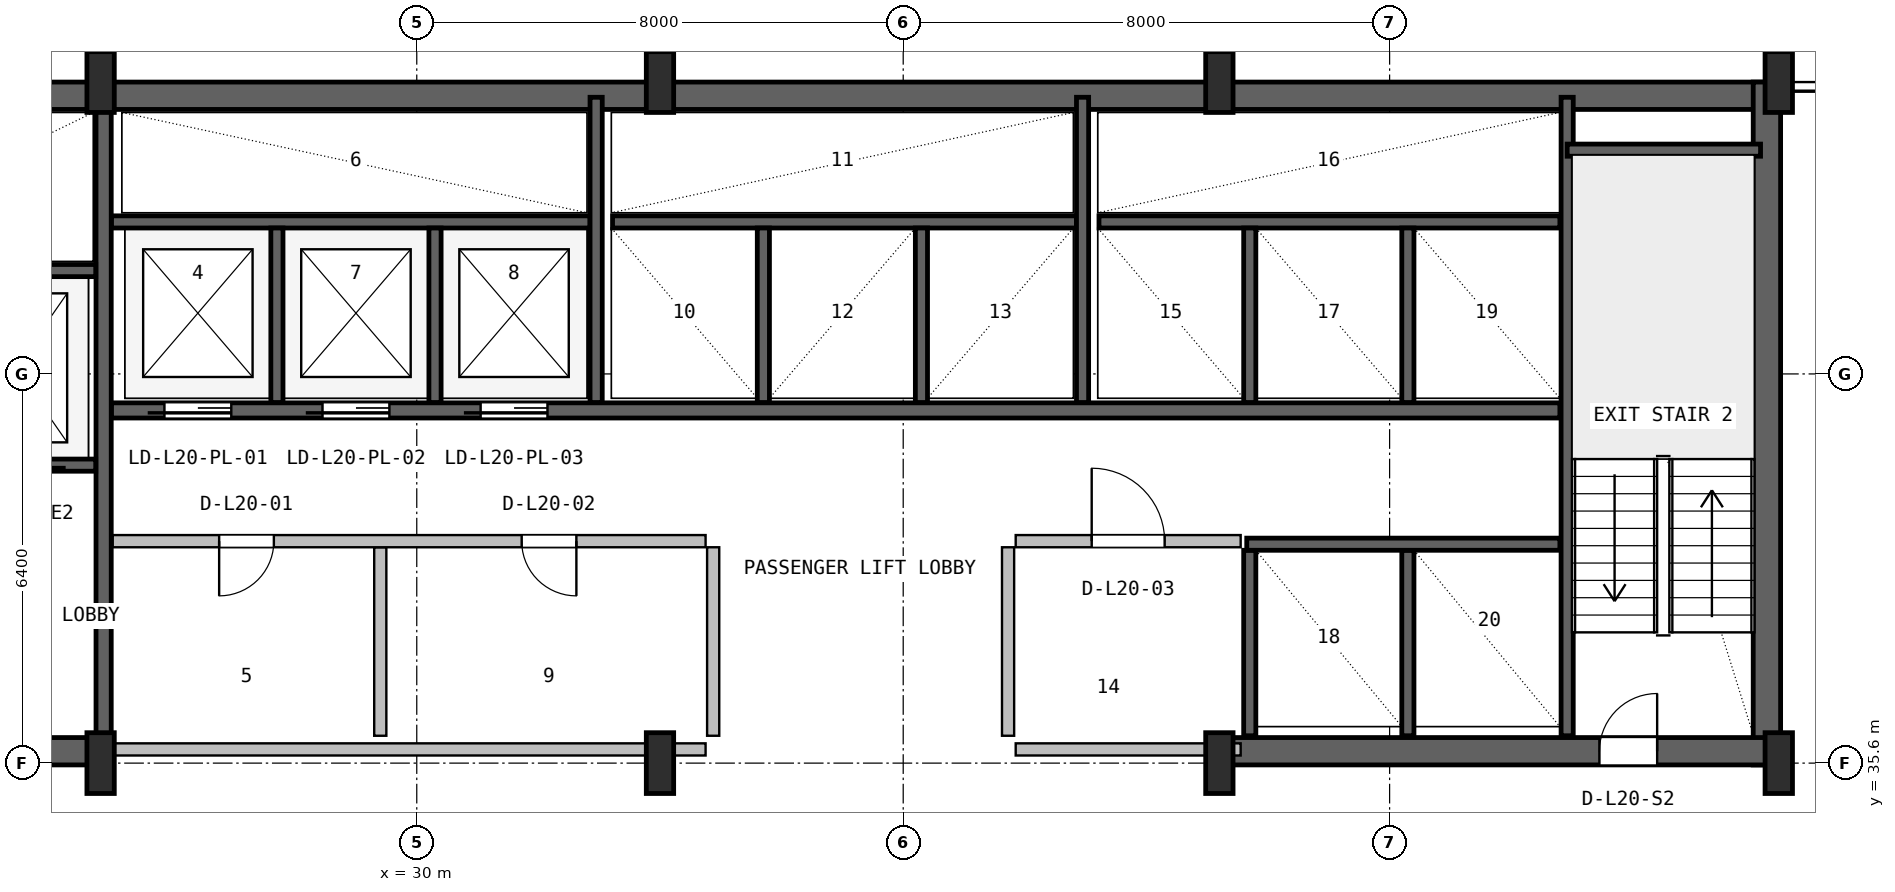
"""IFC4 building model, lengths in metres.
Left out: names, types, materials, properties, quantities, classifications, styles, units other than length and angle.
Written with IfcOpenShell. Run it as: python <this file> out.ifc"""

import sys

from ifc_helpers import new_model, si_unit, direction, frame, frame_2d, origin, origin_2d, place, context, subcontext, project, spatial, rectangle, i_section, extrude, source, transform, mapped, element, fill, save


model = new_model("IFC4")
c1 = context("Model", 3, precision=1e-05, world=origin(), true_north=direction((0.0, 1.0)))
c2 = subcontext(c1, "Body", "Model", "MODEL_VIEW")
j1 = project(units=[si_unit("LENGTHUNIT", "METRE"), si_unit("PLANEANGLEUNIT", "RADIAN")], contexts=[c1])
p1 = place(None, origin())
s1 = spatial("IfcSite", under=j1, at=p1, CompositionType="ELEMENT")
p2 = place(p1, origin())
s2 = spatial("IfcBuilding", under=s1, at=p2, CompositionType="ELEMENT")
p3 = place(p2, frame((0.0, 0.0, 87.0)))
s3 = spatial("IfcBuildingStorey", under=s2, at=p3, CompositionType="ELEMENT", Elevation=87.0)
p4 = place(p3, frame((15.6, 46.575, 0.0), z_axis=(0.0, 0.0, 1.0), x_axis=(1.0, 0.0, 0.0)))
e1 = element("IfcWall", 1, at=p4, inside=s3, PredefinedType="SHEAR", context=c2, shape_type="SweptSolid", body=[
    extrude(rectangle(XDim=36.8, YDim=0.45, at=frame_2d((18.4, 0.0))), origin(), (0.0, 0.0, 1.0), 3.55),
])
p5 = place(p3, frame((52.205, 35.57, 0.0), z_axis=(0.0, 0.0, 1.0), x_axis=(0.0, 1.0, 0.0)))
e2 = element("IfcWall", 2, at=p5, inside=s3, PredefinedType="SHEAR", context=c2, shape_type="SweptSolid", body=[
    extrude(rectangle(XDim=11.23, YDim=0.45, at=frame_2d((5.615, 0.0))), origin(), (0.0, 0.0, 1.0), 3.55),
])
p6 = place(p3, frame((15.57, 35.795, 0.0), z_axis=(0.0, 0.0, 1.0), x_axis=(1.0, 0.0, 0.0)))
e3 = element("IfcWall", 3, at=p6, inside=s3, PredefinedType="SHEAR", context=c2, shape_type="SweptSolid", body=[
    extrude(rectangle(XDim=9.23, YDim=0.45, at=frame_2d((4.615, 0.0))), origin(), (0.0, 0.0, 1.0), 3.55),
])
p7 = place(p6, frame((5.4, 0.0, 0.0)))
e4 = element("IfcOpeningElement", 4, at=p7, cuts=e3, PredefinedType="OPENING", context=c2, shape_type="SweptSolid", body=[
    extrude(rectangle(XDim=1.0, YDim=2.1, at=frame_2d((0.5, 1.05))), frame((0.0, 0.235, 0.0), z_axis=(0.0, -1.0, 0.0), x_axis=(1.0, 0.0, 0.0)), (0.0, 0.0, 1.0), 0.47),
])
p8 = place(p3, frame((43.2, 35.795, 0.0), z_axis=(0.0, 0.0, 1.0), x_axis=(1.0, 0.0, 0.0)))
e5 = element("IfcWall", 5, at=p8, inside=s3, PredefinedType="SHEAR", context=c2, shape_type="SweptSolid", body=[
    extrude(rectangle(XDim=9.23, YDim=0.45, at=frame_2d((4.615, 0.0))), origin(), (0.0, 0.0, 1.0), 3.55),
])
p9 = place(p8, frame((6.25, 0.0, 0.0)))
e6 = element("IfcOpeningElement", 6, at=p9, cuts=e5, PredefinedType="OPENING", context=c2, shape_type="SweptSolid", body=[
    extrude(rectangle(XDim=0.95, YDim=2.1, at=frame_2d((0.475, 1.05))), frame((0.0, 0.235, 0.0), z_axis=(0.0, -1.0, 0.0), x_axis=(1.0, 0.0, 0.0)), (0.0, 0.0, 1.0), 0.47),
])
m1 = source(origin(), c2, "Body", "SweptSolid", [
    extrude(i_section(OverallWidth=0.45, OverallDepth=1.0, WebThickness=0.016, FlangeThickness=0.03, FilletRadius=0.016, at=origin_2d()), origin(), (0.0, 0.0, 1.0), 3.8),
])
for number, where, z_axis, x_axis in (
    (7, (24.8, 35.6, 0.0), (0.0, 0.0, 1.0), (1.0, 0.0, 0.0)),
    (8, (24.8, 46.8, 0.0), (0.0, 0.0, 1.0), (1.0, 0.0, 0.0)),
    (9, (34.0, 35.6, 0.0), (0.0, 0.0, 1.0), (1.0, 0.0, 0.0)),
    (10, (34.0, 46.8, 0.0), (0.0, 0.0, 1.0), (1.0, 0.0, 0.0)),
    (11, (43.2, 35.6, 0.0), (0.0, 0.0, 1.0), (1.0, 0.0, 0.0)),
    (12, (43.2, 46.8, 0.0), (0.0, 0.0, 1.0), (1.0, 0.0, 0.0)),
    (13, (52.4, 35.6, 0.0), (0.0, 0.0, 1.0), (1.0, 0.0, 0.0)),
    (14, (52.4, 46.8, 0.0), (0.0, 0.0, 1.0), (1.0, 0.0, 0.0)),
):
    element("IfcColumn", number, at=place(p3, frame(where, z_axis=z_axis, x_axis=x_axis)), inside=s3, PredefinedType="COLUMN", context=c2, shape_type="MappedRepresentation", body=[
        mapped(m1, transform((0.0, 0.0, 0.0), x_axis=(1.0, 0.0, 0.0), y_axis=(0.0, 1.0, 0.0), z_axis=(0.0, 0.0, 1.0), scale=1.0)),
    ])
p10 = place(p3, frame((24.85, 36.05, 0.0), z_axis=(0.0, 0.0, 1.0), x_axis=(0.0, 1.0, 0.0)))
e15 = element("IfcWall", 15, at=p10, inside=s3, PredefinedType="SHEAR", context=c2, shape_type="SweptSolid", body=[
    extrude(rectangle(XDim=10.45, YDim=0.25, at=frame_2d((5.225, 0.0))), origin(), (0.0, 0.0, 1.0), 3.55),
])
p11 = place(p3, frame((19.2, 40.5, 0.0), z_axis=(0.0, 0.0, 1.0), x_axis=(1.0, 0.0, 0.0)))
e16 = element("IfcWall", 16, at=p11, inside=s3, PredefinedType="SHEAR", context=c2, shape_type="SweptSolid", body=[
    extrude(rectangle(XDim=5.52, YDim=0.2, at=frame_2d((2.76, 0.0))), origin(), (0.0, 0.0, 1.0), 3.55),
])
p12 = place(p11, frame((1.05, 0.0, 0.0)))
e17 = element("IfcOpeningElement", 17, at=p12, cuts=e16, PredefinedType="OPENING", context=c2, shape_type="SweptSolid", body=[
    extrude(rectangle(XDim=1.1, YDim=2.18, at=frame_2d((0.55, 1.09))), frame((0.0, 0.11, 0.0), z_axis=(0.0, -1.0, 0.0), x_axis=(1.0, 0.0, 0.0)), (0.0, 0.0, 1.0), 0.22),
])
p13 = place(p11, frame((3.65, 0.0, 0.0)))
e18 = element("IfcOpeningElement", 18, at=p13, cuts=e16, PredefinedType="OPENING", context=c2, shape_type="SweptSolid", body=[
    extrude(rectangle(XDim=1.1, YDim=2.18, at=frame_2d((0.55, 1.09))), frame((0.0, 0.11, 0.0), z_axis=(0.0, -1.0, 0.0), x_axis=(1.0, 0.0, 0.0)), (0.0, 0.0, 1.0), 0.22),
])
p14 = place(p3, frame((19.2, 43.7, 0.0), z_axis=(0.0, 0.0, 1.0), x_axis=(1.0, 0.0, 0.0)))
e19 = element("IfcWall", 19, at=p14, inside=s3, PredefinedType="SHEAR", context=c2, shape_type="SweptSolid", body=[
    extrude(rectangle(XDim=5.52, YDim=0.2, at=frame_2d((2.76, 0.0))), origin(), (0.0, 0.0, 1.0), 3.55),
])
p15 = place(p3, frame((48.92, 36.05, 0.0), z_axis=(0.0, 0.0, 1.0), x_axis=(0.0, 1.0, 0.0)))
e20 = element("IfcWall", 20, at=p15, inside=s3, PredefinedType="SHEAR", context=c2, shape_type="SweptSolid", body=[
    extrude(rectangle(XDim=10.5, YDim=0.2, at=frame_2d((5.25, 0.0))), origin(), (0.0, 0.0, 1.0), 3.55),
])
p16 = place(p3, frame((48.92, 45.68, 0.0), z_axis=(0.0, 0.0, 1.0), x_axis=(1.0, 0.0, 0.0)))
e21 = element("IfcWall", 21, at=p16, inside=s3, PredefinedType="SHEAR", context=c2, shape_type="SweptSolid", body=[
    extrude(rectangle(XDim=3.18, YDim=0.2, at=frame_2d((1.59, 0.0))), origin(), (0.0, 0.0, 1.0), 3.55),
])
p17 = place(p3, frame((24.98, 41.4, 0.0), z_axis=(0.0, 0.0, 1.0), x_axis=(1.0, 0.0, 0.0)))
e22 = element("IfcWall", 22, at=p17, inside=s3, PredefinedType="SHEAR", context=c2, shape_type="SweptSolid", body=[
    extrude(rectangle(XDim=23.82, YDim=0.25, at=frame_2d((11.91, 0.0))), origin(), (0.0, 0.0, 1.0), 3.55),
])
p18 = place(p17, frame((0.87, 0.0, 0.0)))
e23 = element("IfcOpeningElement", 23, at=p18, cuts=e22, PredefinedType="OPENING", context=c2, shape_type="SweptSolid", body=[
    extrude(rectangle(XDim=1.1, YDim=2.18, at=frame_2d((0.55, 1.09))), frame((0.0, 0.135, 0.0), z_axis=(0.0, -1.0, 0.0), x_axis=(1.0, 0.0, 0.0)), (0.0, 0.0, 1.0), 0.27),
])
p19 = place(p17, frame((3.47, 0.0, 0.0)))
e24 = element("IfcOpeningElement", 24, at=p19, cuts=e22, PredefinedType="OPENING", context=c2, shape_type="SweptSolid", body=[
    extrude(rectangle(XDim=1.1, YDim=2.18, at=frame_2d((0.55, 1.09))), frame((0.0, 0.135, 0.0), z_axis=(0.0, -1.0, 0.0), x_axis=(1.0, 0.0, 0.0)), (0.0, 0.0, 1.0), 0.27),
])
p20 = place(p17, frame((6.07, 0.0, 0.0)))
e25 = element("IfcOpeningElement", 25, at=p20, cuts=e22, PredefinedType="OPENING", context=c2, shape_type="SweptSolid", body=[
    extrude(rectangle(XDim=1.1, YDim=2.18, at=frame_2d((0.55, 1.09))), frame((0.0, 0.135, 0.0), z_axis=(0.0, -1.0, 0.0), x_axis=(1.0, 0.0, 0.0)), (0.0, 0.0, 1.0), 0.27),
])
p21 = place(p3, frame((24.98, 44.5, 0.0), z_axis=(0.0, 0.0, 1.0), x_axis=(1.0, 0.0, 0.0)))
e26 = element("IfcWall", 26, at=p21, inside=s3, PredefinedType="SHEAR", context=c2, shape_type="SweptSolid", body=[
    extrude(rectangle(XDim=7.87, YDim=0.2, at=frame_2d((3.935, 0.0))), origin(), (0.0, 0.0, 1.0), 3.55),
])
for number, where, z_axis, x_axis in (
    (27, (27.7, 41.53, 0.0), (0.0, 0.0, 1.0), (0.0, 1.0, 0.0)),
    (28, (30.3, 41.53, 0.0), (0.0, 0.0, 1.0), (0.0, 1.0, 0.0)),
):
    element("IfcWall", number, at=place(p3, frame(where, z_axis=z_axis, x_axis=x_axis)), inside=s3, PredefinedType="SHEAR", context=c2, shape_type="SweptSolid", body=[
        extrude(rectangle(XDim=2.87, YDim=0.2, at=frame_2d((1.435, 0.0))), origin(), (0.0, 0.0, 1.0), 3.55),
    ])
p22 = place(p3, frame((32.95, 41.53, 0.0), z_axis=(0.0, 0.0, 1.0), x_axis=(0.0, 1.0, 0.0)))
e29 = element("IfcWall", 29, at=p22, inside=s3, PredefinedType="SHEAR", context=c2, shape_type="SweptSolid", body=[
    extrude(rectangle(XDim=5.02, YDim=0.2, at=frame_2d((2.51, 0.0))), origin(), (0.0, 0.0, 1.0), 3.55),
])
p23 = place(p3, frame((33.22, 44.5, 0.0), z_axis=(0.0, 0.0, 1.0), x_axis=(1.0, 0.0, 0.0)))
e30 = element("IfcWall", 30, at=p23, inside=s3, PredefinedType="SHEAR", context=c2, shape_type="SweptSolid", body=[
    extrude(rectangle(XDim=7.63, YDim=0.2, at=frame_2d((3.815, 0.0))), origin(), (0.0, 0.0, 1.0), 3.55),
])
for number, where, z_axis, x_axis in (
    (31, (35.7, 41.53, 0.0), (0.0, 0.0, 1.0), (0.0, 1.0, 0.0)),
    (32, (38.3, 41.53, 0.0), (0.0, 0.0, 1.0), (0.0, 1.0, 0.0)),
):
    element("IfcWall", number, at=place(p3, frame(where, z_axis=z_axis, x_axis=x_axis)), inside=s3, PredefinedType="SHEAR", context=c2, shape_type="SweptSolid", body=[
        extrude(rectangle(XDim=2.87, YDim=0.2, at=frame_2d((1.435, 0.0))), origin(), (0.0, 0.0, 1.0), 3.55),
    ])
p24 = place(p3, frame((40.95, 41.53, 0.0), z_axis=(0.0, 0.0, 1.0), x_axis=(0.0, 1.0, 0.0)))
e33 = element("IfcWall", 33, at=p24, inside=s3, PredefinedType="SHEAR", context=c2, shape_type="SweptSolid", body=[
    extrude(rectangle(XDim=5.02, YDim=0.2, at=frame_2d((2.51, 0.0))), origin(), (0.0, 0.0, 1.0), 3.55),
])
p25 = place(p3, frame((41.22, 44.5, 0.0), z_axis=(0.0, 0.0, 1.0), x_axis=(1.0, 0.0, 0.0)))
e34 = element("IfcWall", 34, at=p25, inside=s3, PredefinedType="SHEAR", context=c2, shape_type="SweptSolid", body=[
    extrude(rectangle(XDim=7.58, YDim=0.2, at=frame_2d((3.79, 0.0))), origin(), (0.0, 0.0, 1.0), 3.55),
])
for number, where, z_axis, x_axis in (
    (35, (43.7, 41.53, 0.0), (0.0, 0.0, 1.0), (0.0, 1.0, 0.0)),
    (36, (46.3, 41.53, 0.0), (0.0, 0.0, 1.0), (0.0, 1.0, 0.0)),
):
    element("IfcWall", number, at=place(p3, frame(where, z_axis=z_axis, x_axis=x_axis)), inside=s3, PredefinedType="SHEAR", context=c2, shape_type="SweptSolid", body=[
        extrude(rectangle(XDim=2.87, YDim=0.2, at=frame_2d((1.435, 0.0))), origin(), (0.0, 0.0, 1.0), 3.55),
    ])
for number, where, z_axis, x_axis in (
    (37, (43.7, 36.05, 0.0), (0.0, 0.0, 1.0), (0.0, 1.0, 0.0)),
    (38, (46.3, 36.05, 0.0), (0.0, 0.0, 1.0), (0.0, 1.0, 0.0)),
):
    element("IfcWall", number, at=place(p3, frame(where, z_axis=z_axis, x_axis=x_axis)), inside=s3, PredefinedType="SHEAR", context=c2, shape_type="SweptSolid", body=[
        extrude(rectangle(XDim=3.05, YDim=0.2, at=frame_2d((1.525, 0.0))), origin(), (0.0, 0.0, 1.0), 3.55),
    ])
p26 = place(p3, frame((43.65, 39.2, 0.0), z_axis=(0.0, 0.0, 1.0), x_axis=(1.0, 0.0, 0.0)))
e39 = element("IfcWall", 39, at=p26, inside=s3, PredefinedType="SHEAR", context=c2, shape_type="SweptSolid", body=[
    extrude(rectangle(XDim=5.15, YDim=0.2, at=frame_2d((2.575, 0.0))), origin(), (0.0, 0.0, 1.0), 3.55),
])
p27 = place(p3, frame((25.0, 35.825, 0.0), z_axis=(0.0, 0.0, 1.0), x_axis=(1.0, 0.0, 0.0)))
e40 = element("IfcWall", 40, at=p27, inside=s3, PredefinedType="PLUMBINGWALL", context=c2, shape_type="SweptSolid", body=[
    extrude(rectangle(XDim=9.75, YDim=0.2, at=frame_2d((4.875, 0.0))), origin(), (0.0, 0.0, 1.0), 2.325),
])
p28 = place(p3, frame((29.4, 36.05, 0.0), z_axis=(0.0, 0.0, 1.0), x_axis=(0.0, 1.0, 0.0)))
e41 = element("IfcWall", 41, at=p28, inside=s3, PredefinedType="PLUMBINGWALL", context=c2, shape_type="SweptSolid", body=[
    extrude(rectangle(XDim=3.1, YDim=0.2, at=frame_2d((1.55, 0.0))), origin(), (0.0, 0.0, 1.0), 3.53),
])
p29 = place(p3, frame((25.0, 39.25, 0.0), z_axis=(0.0, 0.0, 1.0), x_axis=(1.0, 0.0, 0.0)))
e42 = element("IfcWall", 42, at=p29, inside=s3, PredefinedType="PLUMBINGWALL", context=c2, shape_type="SweptSolid", body=[
    extrude(rectangle(XDim=9.75, YDim=0.2, at=frame_2d((4.875, 0.0))), origin(), (0.0, 0.0, 1.0), 3.53),
])
p30 = place(p29, frame((1.75, 0.0, 0.0)))
e43 = element("IfcOpeningElement", 43, at=p30, cuts=e42, PredefinedType="OPENING", context=c2, shape_type="SweptSolid", body=[
    extrude(rectangle(XDim=0.9, YDim=2.06, at=frame_2d((0.45, 1.03))), frame((0.0, 0.11, 0.0), z_axis=(0.0, -1.0, 0.0), x_axis=(1.0, 0.0, 0.0)), (0.0, 0.0, 1.0), 0.22),
])
p31 = place(p29, frame((6.725, 0.0, 0.0)))
e44 = element("IfcOpeningElement", 44, at=p31, cuts=e42, PredefinedType="OPENING", context=c2, shape_type="SweptSolid", body=[
    extrude(rectangle(XDim=0.9, YDim=2.06, at=frame_2d((0.45, 1.03))), frame((0.0, 0.11, 0.0), z_axis=(0.0, -1.0, 0.0), x_axis=(1.0, 0.0, 0.0)), (0.0, 0.0, 1.0), 0.22),
])
p32 = place(p3, frame((34.875, 36.05, 0.0), z_axis=(0.0, 0.0, 1.0), x_axis=(0.0, 1.0, 0.0)))
e45 = element("IfcWall", 45, at=p32, inside=s3, PredefinedType="PLUMBINGWALL", context=c2, shape_type="SweptSolid", body=[
    extrude(rectangle(XDim=3.1, YDim=0.2, at=frame_2d((1.55, 0.0))), origin(), (0.0, 0.0, 1.0), 3.53),
])
p33 = place(p3, frame((39.85, 35.825, 0.0), z_axis=(0.0, 0.0, 1.0), x_axis=(1.0, 0.0, 0.0)))
e46 = element("IfcWall", 46, at=p33, inside=s3, PredefinedType="SOLIDWALL", context=c2, shape_type="SweptSolid", body=[
    extrude(rectangle(XDim=3.7, YDim=0.2, at=frame_2d((1.85, 0.0))), origin(), (0.0, 0.0, 1.0), 2.325),
])
p34 = place(p3, frame((39.85, 39.25, 0.0), z_axis=(0.0, 0.0, 1.0), x_axis=(1.0, 0.0, 0.0)))
e47 = element("IfcWall", 47, at=p34, inside=s3, PredefinedType="SOLIDWALL", context=c2, shape_type="SweptSolid", body=[
    extrude(rectangle(XDim=3.7, YDim=0.2, at=frame_2d((1.85, 0.0))), origin(), (0.0, 0.0, 1.0), 3.53),
])
p35 = place(p34, frame((1.25, 0.0, 0.0)))
e48 = element("IfcOpeningElement", 48, at=p35, cuts=e47, PredefinedType="OPENING", context=c2, shape_type="SweptSolid", body=[
    extrude(rectangle(XDim=1.2, YDim=2.1, at=frame_2d((0.6, 1.05))), frame((0.0, 0.11, 0.0), z_axis=(0.0, -1.0, 0.0), x_axis=(1.0, 0.0, 0.0)), (0.0, 0.0, 1.0), 0.22),
])
p36 = place(p3, frame((39.725, 36.05, 0.0), z_axis=(0.0, 0.0, 1.0), x_axis=(0.0, 1.0, 0.0)))
e49 = element("IfcWall", 49, at=p36, inside=s3, PredefinedType="SOLIDWALL", context=c2, shape_type="SweptSolid", body=[
    extrude(rectangle(XDim=3.1, YDim=0.2, at=frame_2d((1.55, 0.0))), origin(), (0.0, 0.0, 1.0), 3.53),
])
m2 = source(origin(), c2, "Body", "SweptSolid", [
    extrude(rectangle(XDim=0.95, YDim=2.1, at=frame_2d((0.475, 1.05))), frame((0.0, 0.025, 0.0), z_axis=(0.0, -1.0, 0.0), x_axis=(1.0, 0.0, 0.0)), (0.0, 0.0, 1.0), 0.05),
])
p37 = place(p9, origin())
e50 = element("IfcDoor", 50, at=p37, inside=s3, OperationType="SINGLE_SWING_RIGHT", PredefinedType="DOOR", context=c2, shape_type="MappedRepresentation", body=[
    mapped(m2, transform((0.0, 0.0, 0.0), x_axis=(1.0, 0.0, 0.0), y_axis=(0.0, 1.0, 0.0), z_axis=(0.0, 0.0, 1.0), scale=1.0)),
])
fill(e6, e50)
m3 = source(origin(), c2, "Body", "SweptSolid", [
    extrude(rectangle(XDim=1.1, YDim=2.18, at=frame_2d((0.55, 1.09))), frame((0.0, 0.025, 0.0), z_axis=(0.0, -1.0, 0.0), x_axis=(1.0, 0.0, 0.0)), (0.0, 0.0, 1.0), 0.05),
])
p38 = place(p18, frame((1.1, 0.0, 0.0), z_axis=(0.0, 0.0, 1.0), x_axis=(-1.0, 0.0, 0.0)))
e51 = element("IfcDoor", 51, at=p38, inside=s3, OperationType="SLIDING_TO_LEFT", PredefinedType="DOOR", context=c2, shape_type="MappedRepresentation", body=[
    mapped(m3, transform((0.0, 0.0, 0.0), x_axis=(1.0, 0.0, 0.0), y_axis=(0.0, 1.0, 0.0), z_axis=(0.0, 0.0, 1.0), scale=1.0)),
])
fill(e23, e51)
p39 = place(p19, frame((1.1, 0.0, 0.0), z_axis=(0.0, 0.0, 1.0), x_axis=(-1.0, 0.0, 0.0)))
e52 = element("IfcDoor", 52, at=p39, inside=s3, OperationType="SLIDING_TO_LEFT", PredefinedType="DOOR", context=c2, shape_type="MappedRepresentation", body=[
    mapped(m3, transform((0.0, 0.0, 0.0), x_axis=(1.0, 0.0, 0.0), y_axis=(0.0, 1.0, 0.0), z_axis=(0.0, 0.0, 1.0), scale=1.0)),
])
fill(e24, e52)
p40 = place(p20, frame((1.1, 0.0, 0.0), z_axis=(0.0, 0.0, 1.0), x_axis=(-1.0, 0.0, 0.0)))
e53 = element("IfcDoor", 53, at=p40, inside=s3, OperationType="SLIDING_TO_LEFT", PredefinedType="DOOR", context=c2, shape_type="MappedRepresentation", body=[
    mapped(m3, transform((0.0, 0.0, 0.0), x_axis=(1.0, 0.0, 0.0), y_axis=(0.0, 1.0, 0.0), z_axis=(0.0, 0.0, 1.0), scale=1.0)),
])
fill(e25, e53)
m4 = source(origin(), c2, "Body", "SweptSolid", [
    extrude(rectangle(XDim=0.9, YDim=2.06, at=frame_2d((0.45, 1.03))), frame((0.0, 0.025, 0.0), z_axis=(0.0, -1.0, 0.0), x_axis=(1.0, 0.0, 0.0)), (0.0, 0.0, 1.0), 0.05),
])
p41 = place(p30, frame((0.9, 0.0, 0.0), z_axis=(0.0, 0.0, 1.0), x_axis=(-1.0, 0.0, 0.0)))
e54 = element("IfcDoor", 54, at=p41, inside=s3, OperationType="SINGLE_SWING_LEFT", PredefinedType="DOOR", context=c2, shape_type="MappedRepresentation", body=[
    mapped(m4, transform((0.0, 0.0, 0.0), x_axis=(1.0, 0.0, 0.0), y_axis=(0.0, 1.0, 0.0), z_axis=(0.0, 0.0, 1.0), scale=1.0)),
])
fill(e43, e54)
p42 = place(p31, frame((0.9, 0.0, 0.0), z_axis=(0.0, 0.0, 1.0), x_axis=(-1.0, 0.0, 0.0)))
e55 = element("IfcDoor", 55, at=p42, inside=s3, OperationType="SINGLE_SWING_RIGHT", PredefinedType="DOOR", context=c2, shape_type="MappedRepresentation", body=[
    mapped(m4, transform((0.0, 0.0, 0.0), x_axis=(1.0, 0.0, 0.0), y_axis=(0.0, 1.0, 0.0), z_axis=(0.0, 0.0, 1.0), scale=1.0)),
])
fill(e44, e55)
m5 = source(origin(), c2, "Body", "SweptSolid", [
    extrude(rectangle(XDim=1.2, YDim=2.1, at=frame_2d((0.6, 1.05))), frame((0.0, 0.025, 0.0), z_axis=(0.0, -1.0, 0.0), x_axis=(1.0, 0.0, 0.0)), (0.0, 0.0, 1.0), 0.05),
])
p43 = place(p35, origin())
e56 = element("IfcDoor", 56, at=p43, inside=s3, OperationType="SINGLE_SWING_LEFT", PredefinedType="DOOR", context=c2, shape_type="MappedRepresentation", body=[
    mapped(m5, transform((0.0, 0.0, 0.0), x_axis=(1.0, 0.0, 0.0), y_axis=(0.0, 1.0, 0.0), z_axis=(0.0, 0.0, 1.0), scale=1.0)),
])
fill(e48, e56)
save(model, sys.argv[1])
